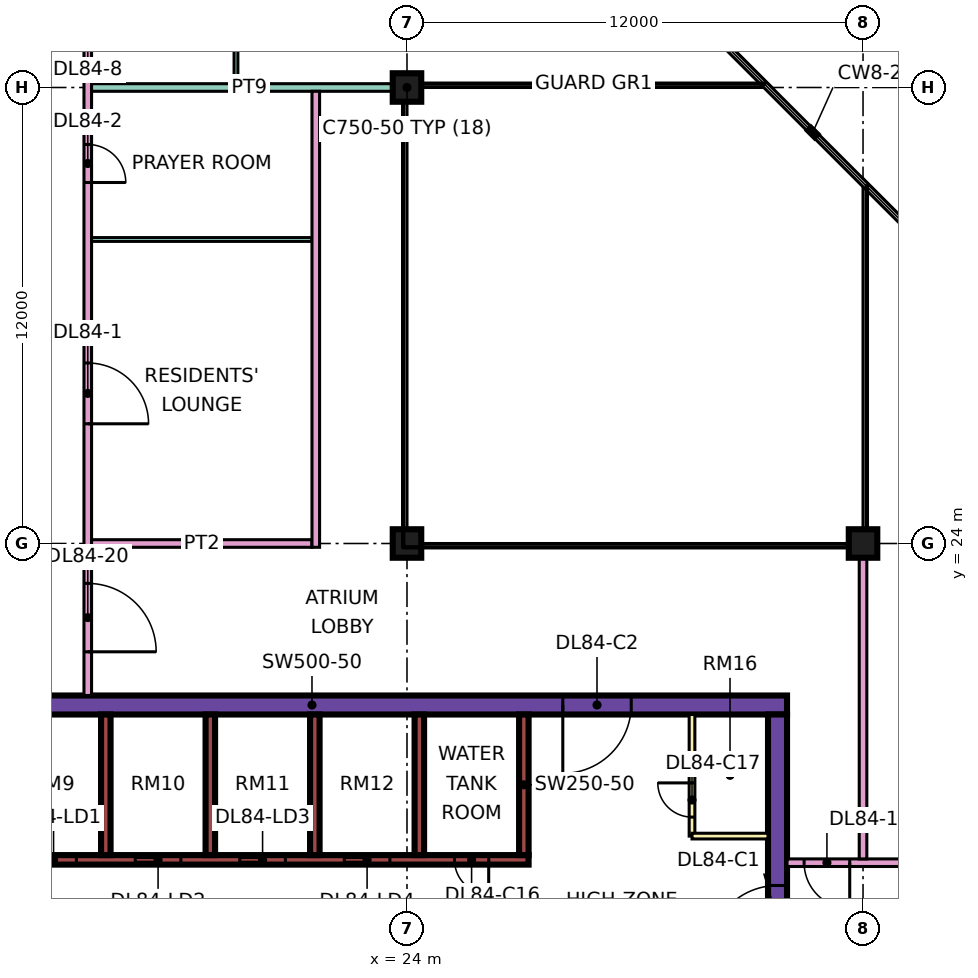
"""IFC4 building model, lengths in metres.
Left out: names, types, materials, properties, quantities, classifications, styles, units other than length and angle.
Written with IfcOpenShell. Run it as: python <this file> out.ifc"""

import sys

from ifc_helpers import new_model, si_unit, direction, frame, frame_2d, origin, origin_2d, place, context, subcontext, project, spatial, rectangle, extrude, element, fill, save


model = new_model("IFC4")
c1 = context("Model", 3, precision=1e-05, world=origin(), true_north=direction((0.0, 1.0)))
c2 = subcontext(c1, "Body", "Model", "MODEL_VIEW")
j1 = project(units=[si_unit("LENGTHUNIT", "METRE"), si_unit("PLANEANGLEUNIT", "RADIAN")], contexts=[c1])
p1 = place(None, origin())
s1 = spatial("IfcSite", under=j1, at=p1, CompositionType="ELEMENT")
p2 = place(p1, origin())
s2 = spatial("IfcBuilding", under=s1, at=p2, CompositionType="ELEMENT")
p3 = place(p2, frame((0.0, 0.0, 361.4)))
s3 = spatial("IfcBuildingStorey", under=s2, at=p3, CompositionType="ELEMENT", Elevation=361.4)
for number, where, z_axis, x_axis in (
    (1, (24.0, 24.0, 0.0), (0.0, 0.0, 1.0), (1.0, 0.0, 0.0)),
    (2, (24.0, 36.0, 0.0), (0.0, 0.0, 1.0), (1.0, 0.0, 0.0)),
    (3, (36.0, 24.0, 0.0), (0.0, 0.0, 1.0), (1.0, 0.0, 0.0)),
):
    element("IfcColumn", number, at=place(p3, frame(where, z_axis=z_axis, x_axis=x_axis)), inside=s3, PredefinedType="COLUMN", context=c2, shape_type="SweptSolid", body=[
        extrude(rectangle(XDim=0.75, YDim=0.75, at=origin_2d()), origin(), (0.0, 0.0, 1.0), 3.75),
    ])
p4 = place(p3, frame((9.0, 19.75, 0.0), z_axis=(0.0, 0.0, 1.0), x_axis=(1.0, 0.0, 0.0)))
e4 = element("IfcWall", 4, at=p4, inside=s3, PredefinedType="SHEAR", context=c2, shape_type="SweptSolid", body=[
    extrude(rectangle(XDim=25.0, YDim=0.5, at=frame_2d((12.5, 0.0))), origin(), (0.0, 0.0, 1.0), 3.75),
])
p5 = place(p4, frame((19.1, 0.0, 0.0)))
e5 = element("IfcOpeningElement", 5, at=p5, cuts=e4, PredefinedType="OPENING", context=c2, shape_type="SweptSolid", body=[
    extrude(rectangle(XDim=1.8, YDim=2.4, at=frame_2d((0.9, 1.2))), frame((0.0, 0.26, 0.0), z_axis=(0.0, -1.0, 0.0), x_axis=(1.0, 0.0, 0.0)), (0.0, 0.0, 1.0), 0.52),
])
p6 = place(p3, frame((33.75, 7.5, 0.0), z_axis=(0.0, 0.0, 1.0), x_axis=(0.0, 1.0, 0.0)))
e6 = element("IfcWall", 6, at=p6, inside=s3, PredefinedType="SHEAR", context=c2, shape_type="SweptSolid", body=[
    extrude(rectangle(XDim=12.0, YDim=0.5, at=frame_2d((6.0, 0.0))), origin(), (0.0, 0.0, 1.0), 3.75),
])
p7 = place(p6, frame((5.7, 0.0, 0.0)))
e7 = element("IfcOpeningElement", 7, at=p7, cuts=e6, PredefinedType="OPENING", context=c2, shape_type="SweptSolid", body=[
    extrude(rectangle(XDim=1.8, YDim=2.4, at=frame_2d((0.9, 1.2))), frame((0.0, 0.26, 0.0), z_axis=(0.0, -1.0, 0.0), x_axis=(1.0, 0.0, 0.0)), (0.0, 0.0, 1.0), 0.52),
])
p8 = place(p3, frame((13.45, 15.675, 0.0), z_axis=(0.0, 0.0, 1.0), x_axis=(1.0, 0.0, 0.0)))
e8 = element("IfcWall", 8, at=p8, inside=s3, PredefinedType="SHEAR", context=c2, shape_type="SweptSolid", body=[
    extrude(rectangle(XDim=13.75, YDim=0.25, at=frame_2d((6.875, 0.0))), origin(), (0.0, 0.0, 1.0), 3.75),
])
p9 = place(p8, frame((0.65, 0.0, 0.0)))
e9 = element("IfcOpeningElement", 9, at=p9, cuts=e8, PredefinedType="OPENING", context=c2, shape_type="SweptSolid", body=[
    extrude(rectangle(XDim=1.2, YDim=2.2, at=frame_2d((0.6, 1.1))), frame((0.0, 0.135, 0.0), z_axis=(0.0, -1.0, 0.0), x_axis=(1.0, 0.0, 0.0)), (0.0, 0.0, 1.0), 0.27),
])
p10 = place(p8, frame((3.4, 0.0, 0.0)))
e10 = element("IfcOpeningElement", 10, at=p10, cuts=e8, PredefinedType="OPENING", context=c2, shape_type="SweptSolid", body=[
    extrude(rectangle(XDim=1.2, YDim=2.2, at=frame_2d((0.6, 1.1))), frame((0.0, 0.135, 0.0), z_axis=(0.0, -1.0, 0.0), x_axis=(1.0, 0.0, 0.0)), (0.0, 0.0, 1.0), 0.27),
])
p11 = place(p8, frame((6.15, 0.0, 0.0)))
e11 = element("IfcOpeningElement", 11, at=p11, cuts=e8, PredefinedType="OPENING", context=c2, shape_type="SweptSolid", body=[
    extrude(rectangle(XDim=1.2, YDim=2.2, at=frame_2d((0.6, 1.1))), frame((0.0, 0.135, 0.0), z_axis=(0.0, -1.0, 0.0), x_axis=(1.0, 0.0, 0.0)), (0.0, 0.0, 1.0), 0.27),
])
p12 = place(p8, frame((8.9, 0.0, 0.0)))
e12 = element("IfcOpeningElement", 12, at=p12, cuts=e8, PredefinedType="OPENING", context=c2, shape_type="SweptSolid", body=[
    extrude(rectangle(XDim=1.2, YDim=2.2, at=frame_2d((0.6, 1.1))), frame((0.0, 0.135, 0.0), z_axis=(0.0, -1.0, 0.0), x_axis=(1.0, 0.0, 0.0)), (0.0, 0.0, 1.0), 0.27),
])
p13 = place(p8, frame((11.8, 0.0, 0.0)))
e13 = element("IfcOpeningElement", 13, at=p13, cuts=e8, PredefinedType="OPENING", context=c2, shape_type="SweptSolid", body=[
    extrude(rectangle(XDim=0.9, YDim=2.1, at=frame_2d((0.45, 1.05))), frame((0.0, 0.135, 0.0), z_axis=(0.0, -1.0, 0.0), x_axis=(1.0, 0.0, 0.0)), (0.0, 0.0, 1.0), 0.27),
])
for number, where, z_axis, x_axis in (
    (14, (16.075, 15.8, 0.0), (0.0, 0.0, 1.0), (0.0, 1.0, 0.0)),
    (15, (18.825, 15.8, 0.0), (0.0, 0.0, 1.0), (0.0, 1.0, 0.0)),
    (16, (21.575, 15.8, 0.0), (0.0, 0.0, 1.0), (0.0, 1.0, 0.0)),
    (17, (24.325, 15.8, 0.0), (0.0, 0.0, 1.0), (0.0, 1.0, 0.0)),
    (18, (27.075, 15.8, 0.0), (0.0, 0.0, 1.0), (0.0, 1.0, 0.0)),
):
    element("IfcWall", number, at=place(p3, frame(where, z_axis=z_axis, x_axis=x_axis)), inside=s3, PredefinedType="SHEAR", context=c2, shape_type="SweptSolid", body=[
        extrude(rectangle(XDim=3.7, YDim=0.25, at=frame_2d((1.85, 0.0))), origin(), (0.0, 0.0, 1.0), 3.75),
    ])
p14 = place(p3, frame((31.5, 16.3, 0.0), z_axis=(0.0, 0.0, 1.0), x_axis=(0.0, 1.0, 0.0)))
e19 = element("IfcWall", 19, at=p14, inside=s3, PredefinedType="PARTITIONING", context=c2, shape_type="SweptSolid", body=[
    extrude(rectangle(XDim=3.2, YDim=0.15, at=frame_2d((1.6, 0.0))), origin(), (0.0, 0.0, 1.0), 3.35),
])
p15 = place(p14, frame((0.5, 0.0, 0.0)))
e20 = element("IfcOpeningElement", 20, at=p15, cuts=e19, PredefinedType="OPENING", context=c2, shape_type="SweptSolid", body=[
    extrude(rectangle(XDim=0.9, YDim=2.1, at=frame_2d((0.45, 1.05))), frame((0.0, 0.085, 0.0), z_axis=(0.0, -1.0, 0.0), x_axis=(1.0, 0.0, 0.0)), (0.0, 0.0, 1.0), 0.17),
])
p16 = place(p3, frame((31.5, 16.3, 0.0), z_axis=(0.0, 0.0, 1.0), x_axis=(1.0, 0.0, 0.0)))
e21 = element("IfcWall", 21, at=p16, inside=s3, PredefinedType="PARTITIONING", context=c2, shape_type="SweptSolid", body=[
    extrude(rectangle(XDim=2.0, YDim=0.15, at=frame_2d((1.0, 0.0))), origin(), (0.0, 0.0, 1.0), 3.35),
])
p17 = place(p3, frame((15.6, 20.0, 0.0), z_axis=(0.0, 0.0, 1.0), x_axis=(0.0, 1.0, 0.0)))
e22 = element("IfcWall", 22, at=p17, inside=s3, PredefinedType="PARTITIONING", context=c2, shape_type="SweptSolid", body=[
    extrude(rectangle(XDim=27.775, YDim=0.2, at=frame_2d((13.887, 0.0))), origin(), (0.0, 0.0, 1.0), 3.35),
])
p18 = place(p17, frame((7.15, 0.0, 0.0)))
e23 = element("IfcOpeningElement", 23, at=p18, cuts=e22, PredefinedType="OPENING", context=c2, shape_type="SweptSolid", body=[
    extrude(rectangle(XDim=1.6, YDim=2.1, at=frame_2d((0.8, 1.05))), frame((0.0, 0.11, 0.0), z_axis=(0.0, -1.0, 0.0), x_axis=(1.0, 0.0, 0.0)), (0.0, 0.0, 1.0), 0.22),
])
p19 = place(p17, frame((13.5, 0.0, 0.0)))
e24 = element("IfcOpeningElement", 24, at=p19, cuts=e22, PredefinedType="OPENING", context=c2, shape_type="SweptSolid", body=[
    extrude(rectangle(XDim=1.0, YDim=2.1, at=frame_2d((0.5, 1.05))), frame((0.0, 0.11, 0.0), z_axis=(0.0, -1.0, 0.0), x_axis=(1.0, 0.0, 0.0)), (0.0, 0.0, 1.0), 0.22),
])
p20 = place(p17, frame((17.05, 0.0, 0.0)))
e25 = element("IfcOpeningElement", 25, at=p20, cuts=e22, PredefinedType="OPENING", context=c2, shape_type="SweptSolid", body=[
    extrude(rectangle(XDim=1.0, YDim=2.1, at=frame_2d((0.5, 1.05))), frame((0.0, 0.11, 0.0), z_axis=(0.0, -1.0, 0.0), x_axis=(1.0, 0.0, 0.0)), (0.0, 0.0, 1.0), 0.22),
])
p21 = place(p17, frame((1.15, 0.0, 0.0)))
e26 = element("IfcOpeningElement", 26, at=p21, cuts=e22, PredefinedType="OPENING", context=c2, shape_type="SweptSolid", body=[
    extrude(rectangle(XDim=1.8, YDim=2.1, at=frame_2d((0.9, 1.05))), frame((0.0, 0.11, 0.0), z_axis=(0.0, -1.0, 0.0), x_axis=(1.0, 0.0, 0.0)), (0.0, 0.0, 1.0), 0.22),
])
p22 = place(p17, frame((25.9, 0.0, 0.0)))
e27 = element("IfcOpeningElement", 27, at=p22, cuts=e22, PredefinedType="OPENING", context=c2, shape_type="SweptSolid", body=[
    extrude(rectangle(XDim=1.0, YDim=2.1, at=frame_2d((0.5, 1.05))), frame((0.0, 0.11, 0.0), z_axis=(0.0, -1.0, 0.0), x_axis=(1.0, 0.0, 0.0)), (0.0, 0.0, 1.0), 0.22),
])
p23 = place(p3, frame((15.7, 24.0, 0.0), z_axis=(0.0, 0.0, 1.0), x_axis=(1.0, 0.0, 0.0)))
e28 = element("IfcWall", 28, at=p23, inside=s3, PredefinedType="PARTITIONING", context=c2, shape_type="SweptSolid", body=[
    extrude(rectangle(XDim=5.8, YDim=0.2, at=frame_2d((2.9, 0.0))), origin(), (0.0, 0.0, 1.0), 3.35),
])
p24 = place(p3, frame((15.7, 32.0, 0.0), z_axis=(0.0, 0.0, 1.0), x_axis=(1.0, 0.0, 0.0)))
e29 = element("IfcWall", 29, at=p24, inside=s3, PredefinedType="PARTITIONING", context=c2, shape_type="SweptSolid", body=[
    extrude(rectangle(XDim=5.8, YDim=0.1, at=frame_2d((2.9, 0.0))), origin(), (0.0, 0.0, 1.0), 3.35),
])
p25 = place(p3, frame((15.7, 36.0, 0.0), z_axis=(0.0, 0.0, 1.0), x_axis=(1.0, 0.0, 0.0)))
e30 = element("IfcWall", 30, at=p25, inside=s3, PredefinedType="PARTITIONING", context=c2, shape_type="SweptSolid", body=[
    extrude(rectangle(XDim=8.3, YDim=0.2, at=frame_2d((4.15, 0.0))), origin(), (0.0, 0.0, 1.0), 3.35),
])
p26 = place(p3, frame((19.5, 36.1, 0.0), z_axis=(0.0, 0.0, 1.0), x_axis=(0.0, 1.0, 0.0)))
e31 = element("IfcWall", 31, at=p26, inside=s3, PredefinedType="PARTITIONING", context=c2, shape_type="SweptSolid", body=[
    extrude(rectangle(XDim=2.85, YDim=0.1, at=frame_2d((1.425, 0.0))), origin(), (0.0, 0.0, 1.0), 3.35),
])
p27 = place(p26, frame((0.95, 0.0, 0.0)))
e32 = element("IfcOpeningElement", 32, at=p27, cuts=e31, PredefinedType="OPENING", context=c2, shape_type="SweptSolid", body=[
    extrude(rectangle(XDim=0.9, YDim=2.1, at=frame_2d((0.45, 1.05))), frame((0.0, 0.06, 0.0), z_axis=(0.0, -1.0, 0.0), x_axis=(1.0, 0.0, 0.0)), (0.0, 0.0, 1.0), 0.12),
])
p28 = place(p3, frame((21.6, 23.9, 0.0), z_axis=(0.0, 0.0, 1.0), x_axis=(0.0, 1.0, 0.0)))
e33 = element("IfcWall", 33, at=p28, inside=s3, PredefinedType="PARTITIONING", context=c2, shape_type="SweptSolid", body=[
    extrude(rectangle(XDim=12.0, YDim=0.2, at=frame_2d((6.0, 0.0))), origin(), (0.0, 0.0, 1.0), 3.35),
])
p29 = place(p3, frame((34.0, 15.6, 0.0), z_axis=(0.0, 0.0, 1.0), x_axis=(1.0, 0.0, 0.0)))
e34 = element("IfcWall", 34, at=p29, inside=s3, PredefinedType="PARTITIONING", context=c2, shape_type="SweptSolid", body=[
    extrude(rectangle(XDim=10.35, YDim=0.2, at=frame_2d((5.175, 0.0))), origin(), (0.0, 0.0, 1.0), 3.35),
])
p30 = place(p29, frame((5.6, 0.0, 0.0)))
e35 = element("IfcOpeningElement", 35, at=p30, cuts=e34, PredefinedType="OPENING", context=c2, shape_type="SweptSolid", body=[
    extrude(rectangle(XDim=1.0, YDim=2.1, at=frame_2d((0.5, 1.05))), frame((0.0, 0.11, 0.0), z_axis=(0.0, -1.0, 0.0), x_axis=(1.0, 0.0, 0.0)), (0.0, 0.0, 1.0), 0.22),
])
p31 = place(p29, frame((0.45, 0.0, 0.0)))
e36 = element("IfcOpeningElement", 36, at=p31, cuts=e34, PredefinedType="OPENING", context=c2, shape_type="SweptSolid", body=[
    extrude(rectangle(XDim=1.2, YDim=2.1, at=frame_2d((0.6, 1.05))), frame((0.0, 0.11, 0.0), z_axis=(0.0, -1.0, 0.0), x_axis=(1.0, 0.0, 0.0)), (0.0, 0.0, 1.0), 0.22),
])
p32 = place(p3, frame((36.0, 15.7, 0.0), z_axis=(0.0, 0.0, 1.0), x_axis=(0.0, 1.0, 0.0)))
e37 = element("IfcWall", 37, at=p32, inside=s3, PredefinedType="PARTITIONING", context=c2, shape_type="SweptSolid", body=[
    extrude(rectangle(XDim=8.3, YDim=0.2, at=frame_2d((4.15, 0.0))), origin(), (0.0, 0.0, 1.0), 3.35),
])
p33 = place(p9, origin())
e38 = element("IfcDoor", 38, at=p33, inside=s3, OperationType="DOUBLE_DOOR_SLIDING", PredefinedType="DOOR", context=c2, shape_type="SweptSolid", body=[
    extrude(rectangle(XDim=1.2, YDim=2.2, at=frame_2d((0.6, 1.1))), frame((0.0, 0.025, 0.0), z_axis=(0.0, -1.0, 0.0), x_axis=(1.0, 0.0, 0.0)), (0.0, 0.0, 1.0), 0.05),
])
fill(e9, e38)
p34 = place(p10, origin())
e39 = element("IfcDoor", 39, at=p34, inside=s3, OperationType="DOUBLE_DOOR_SLIDING", PredefinedType="DOOR", context=c2, shape_type="SweptSolid", body=[
    extrude(rectangle(XDim=1.2, YDim=2.2, at=frame_2d((0.6, 1.1))), frame((0.0, 0.025, 0.0), z_axis=(0.0, -1.0, 0.0), x_axis=(1.0, 0.0, 0.0)), (0.0, 0.0, 1.0), 0.05),
])
fill(e10, e39)
p35 = place(p11, origin())
e40 = element("IfcDoor", 40, at=p35, inside=s3, OperationType="DOUBLE_DOOR_SLIDING", PredefinedType="DOOR", context=c2, shape_type="SweptSolid", body=[
    extrude(rectangle(XDim=1.2, YDim=2.2, at=frame_2d((0.6, 1.1))), frame((0.0, 0.025, 0.0), z_axis=(0.0, -1.0, 0.0), x_axis=(1.0, 0.0, 0.0)), (0.0, 0.0, 1.0), 0.05),
])
fill(e11, e40)
p36 = place(p12, origin())
e41 = element("IfcDoor", 41, at=p36, inside=s3, OperationType="DOUBLE_DOOR_SLIDING", PredefinedType="DOOR", context=c2, shape_type="SweptSolid", body=[
    extrude(rectangle(XDim=1.2, YDim=2.2, at=frame_2d((0.6, 1.1))), frame((0.0, 0.025, 0.0), z_axis=(0.0, -1.0, 0.0), x_axis=(1.0, 0.0, 0.0)), (0.0, 0.0, 1.0), 0.05),
])
fill(e12, e41)
p37 = place(p7, origin())
e42 = element("IfcDoor", 42, at=p37, inside=s3, OperationType="DOUBLE_DOOR_SINGLE_SWING", PredefinedType="DOOR", context=c2, shape_type="SweptSolid", body=[
    extrude(rectangle(XDim=1.8, YDim=2.4, at=frame_2d((0.9, 1.2))), frame((0.0, 0.025, 0.0), z_axis=(0.0, -1.0, 0.0), x_axis=(1.0, 0.0, 0.0)), (0.0, 0.0, 1.0), 0.05),
])
fill(e7, e42)
p38 = place(p5, frame((1.8, 0.0, 0.0), z_axis=(0.0, 0.0, 1.0), x_axis=(-1.0, 0.0, 0.0)))
e43 = element("IfcDoor", 43, at=p38, inside=s3, OperationType="DOUBLE_DOOR_SINGLE_SWING", PredefinedType="DOOR", context=c2, shape_type="SweptSolid", body=[
    extrude(rectangle(XDim=1.8, YDim=2.4, at=frame_2d((0.9, 1.2))), frame((0.0, 0.025, 0.0), z_axis=(0.0, -1.0, 0.0), x_axis=(1.0, 0.0, 0.0)), (0.0, 0.0, 1.0), 0.05),
])
fill(e5, e43)
p39 = place(p13, origin())
e44 = element("IfcDoor", 44, at=p39, inside=s3, OperationType="SINGLE_SWING_RIGHT", PredefinedType="DOOR", context=c2, shape_type="SweptSolid", body=[
    extrude(rectangle(XDim=0.9, YDim=2.1, at=frame_2d((0.45, 1.05))), frame((0.0, 0.025, 0.0), z_axis=(0.0, -1.0, 0.0), x_axis=(1.0, 0.0, 0.0)), (0.0, 0.0, 1.0), 0.05),
])
fill(e13, e44)
p40 = place(p15, frame((0.9, 0.0, 0.0), z_axis=(0.0, 0.0, 1.0), x_axis=(-1.0, 0.0, 0.0)))
e45 = element("IfcDoor", 45, at=p40, inside=s3, OperationType="SINGLE_SWING_RIGHT", PredefinedType="DOOR", context=c2, shape_type="SweptSolid", body=[
    extrude(rectangle(XDim=0.9, YDim=2.1, at=frame_2d((0.45, 1.05))), frame((0.0, 0.025, 0.0), z_axis=(0.0, -1.0, 0.0), x_axis=(1.0, 0.0, 0.0)), (0.0, 0.0, 1.0), 0.05),
])
fill(e20, e45)
p41 = place(p18, frame((1.6, 0.0, 0.0), z_axis=(0.0, 0.0, 1.0), x_axis=(-1.0, 0.0, 0.0)))
e46 = element("IfcDoor", 46, at=p41, inside=s3, OperationType="DOUBLE_DOOR_SINGLE_SWING", PredefinedType="DOOR", context=c2, shape_type="SweptSolid", body=[
    extrude(rectangle(XDim=1.6, YDim=2.1, at=frame_2d((0.8, 1.05))), frame((0.0, 0.025, 0.0), z_axis=(0.0, -1.0, 0.0), x_axis=(1.0, 0.0, 0.0)), (0.0, 0.0, 1.0), 0.05),
])
fill(e23, e46)
p42 = place(p19, frame((1.0, 0.0, 0.0), z_axis=(0.0, 0.0, 1.0), x_axis=(-1.0, 0.0, 0.0)))
e47 = element("IfcDoor", 47, at=p42, inside=s3, OperationType="SINGLE_SWING_LEFT", PredefinedType="DOOR", context=c2, shape_type="SweptSolid", body=[
    extrude(rectangle(XDim=1.0, YDim=2.1, at=frame_2d((0.5, 1.05))), frame((0.0, 0.025, 0.0), z_axis=(0.0, -1.0, 0.0), x_axis=(1.0, 0.0, 0.0)), (0.0, 0.0, 1.0), 0.05),
])
fill(e24, e47)
p43 = place(p31, origin())
e48 = element("IfcDoor", 48, at=p43, inside=s3, OperationType="SINGLE_SWING_RIGHT", PredefinedType="DOOR", context=c2, shape_type="SweptSolid", body=[
    extrude(rectangle(XDim=1.2, YDim=2.1, at=frame_2d((0.6, 1.05))), frame((0.0, 0.025, 0.0), z_axis=(0.0, -1.0, 0.0), x_axis=(1.0, 0.0, 0.0)), (0.0, 0.0, 1.0), 0.05),
])
fill(e36, e48)
p44 = place(p21, frame((1.8, 0.0, 0.0), z_axis=(0.0, 0.0, 1.0), x_axis=(-1.0, 0.0, 0.0)))
e49 = element("IfcDoor", 49, at=p44, inside=s3, OperationType="DOUBLE_DOOR_SINGLE_SWING", PredefinedType="DOOR", context=c2, shape_type="SweptSolid", body=[
    extrude(rectangle(XDim=1.8, YDim=2.1, at=frame_2d((0.9, 1.05))), frame((0.0, 0.025, 0.0), z_axis=(0.0, -1.0, 0.0), x_axis=(1.0, 0.0, 0.0)), (0.0, 0.0, 1.0), 0.05),
])
fill(e26, e49)
save(model, sys.argv[1])
